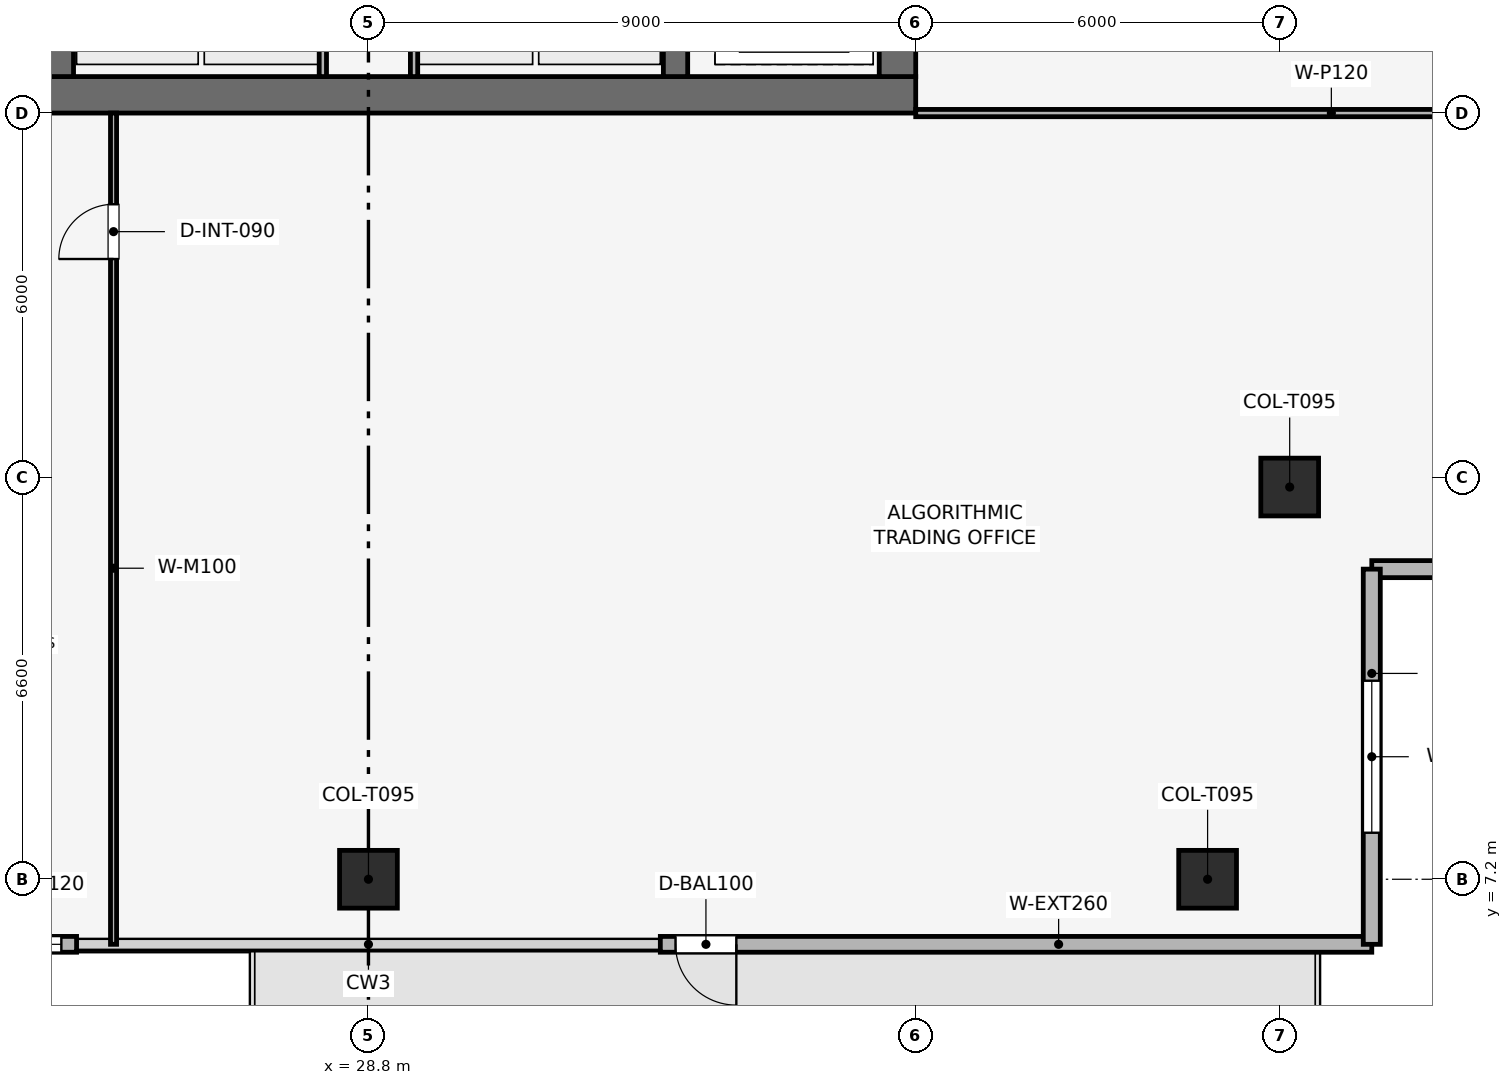
"""IFC4 building model, lengths in metres.
Left out: names, types, materials, properties, quantities, classifications, styles, units other than length and angle.
Written with IfcOpenShell. Run it as: python <this file> out.ifc"""

import sys

from ifc_helpers import new_model, si_unit, direction, frame, frame_2d, origin, origin_2d, place, context, subcontext, project, spatial, rectangle, extrude, element, fill, save


model = new_model("IFC4")
c1 = context("Model", 3, precision=1e-05, world=origin(), true_north=direction((0.0, 1.0)))
c2 = subcontext(c1, "Body", "Model", "MODEL_VIEW")
j1 = project(units=[si_unit("LENGTHUNIT", "METRE"), si_unit("PLANEANGLEUNIT", "RADIAN")], contexts=[c1])
p1 = place(None, origin())
s1 = spatial("IfcSite", under=j1, at=p1, CompositionType="ELEMENT")
p2 = place(p1, origin())
s2 = spatial("IfcBuilding", under=s1, at=p2, CompositionType="ELEMENT")
p3 = place(p2, frame((0.0, 0.0, 299.25)))
s3 = spatial("IfcBuildingStorey", under=s2, at=p3, CompositionType="ELEMENT", Elevation=299.25)
p4 = place(p3, frame((19.8, 20.1, 0.0), z_axis=(0.0, 0.0, 1.0), x_axis=(1.0, 0.0, 0.0)))
e1 = element("IfcWall", 1, at=p4, inside=s3, PredefinedType="SHEAR", context=c2, shape_type="SweptSolid", body=[
    extrude(rectangle(XDim=18.0, YDim=0.6, at=frame_2d((9.0, 0.0))), origin(), (0.0, 0.0, 1.0), 3.75),
])
p5 = place(p3, frame((37.5, 20.4, 0.0), z_axis=(0.0, 0.0, 1.0), x_axis=(0.0, 1.0, 0.0)))
e2 = element("IfcWall", 2, at=p5, inside=s3, PredefinedType="SHEAR", context=c2, shape_type="SweptSolid", body=[
    extrude(rectangle(XDim=16.8, YDim=0.6, at=frame_2d((8.4, 0.0))), origin(), (0.0, 0.0, 1.0), 3.75),
])
p6 = place(p5, frame((4.9, 0.0, 0.0)))
e3 = element("IfcOpeningElement", 3, at=p6, cuts=e2, PredefinedType="OPENING", context=c2, shape_type="SweptSolid", body=[
    extrude(rectangle(XDim=1.1, YDim=2.15, at=frame_2d((0.55, 1.075))), frame((0.0, 0.31, 0.0), z_axis=(0.0, -1.0, 0.0), x_axis=(1.0, 0.0, 0.0)), (0.0, 0.0, 1.0), 0.62),
])
for number, where, z_axis, x_axis in (
    (4, (23.75, 20.4, 0.0), (0.0, 0.0, 1.0), (0.0, 1.0, 0.0)),
    (5, (33.85, 20.4, 0.0), (0.0, 0.0, 1.0), (0.0, 1.0, 0.0)),
):
    element("IfcWall", number, at=place(p3, frame(where, z_axis=z_axis, x_axis=x_axis)), inside=s3, PredefinedType="SHEAR", context=c2, shape_type="SweptSolid", body=[
        extrude(rectangle(XDim=16.8, YDim=0.4, at=frame_2d((8.4, 0.0))), origin(), (0.0, 0.0, 1.0), 3.75),
    ])
for number, where, z_axis, x_axis in (
    (6, (28.8, 7.2, 0.003), (0.0, 0.0, 1.0), (1.0, 0.0, 0.0)),
    (7, (42.6, 7.2, 0.003), (0.0, 0.0, 1.0), (1.0, 0.0, 0.0)),
    (8, (43.95, 13.65, 0.003), (0.0, 0.0, 1.0), (1.0, 0.0, 0.0)),
):
    element("IfcColumn", number, at=place(p3, frame(where, z_axis=z_axis, x_axis=x_axis)), inside=s3, PredefinedType="COLUMN", context=c2, shape_type="SweptSolid", body=[
        extrude(rectangle(XDim=0.95, YDim=0.95, at=origin_2d()), origin(), (0.0, 0.0, 1.0), 3.504),
    ])
p7 = place(p3, frame((45.3, 6.13, 0.0), z_axis=(0.0, 0.0, 1.0), x_axis=(-1.0, 0.0, 0.0)))
e9 = element("IfcWall", 9, at=p7, inside=s3, PredefinedType="SOLIDWALL", context=c2, shape_type="SweptSolid", body=[
    extrude(rectangle(XDim=11.7, YDim=0.26, at=frame_2d((5.85, 0.0))), origin(), (0.0, 0.0, 1.0), 3.51),
])
p8 = place(p7, frame((10.45, 0.0, 0.0)))
e10 = element("IfcOpeningElement", 10, at=p8, cuts=e9, PredefinedType="OPENING", context=c2, shape_type="SweptSolid", body=[
    extrude(rectangle(XDim=1.0, YDim=2.2, at=frame_2d((0.5, 1.1))), frame((0.0, 0.14, 0.0), z_axis=(0.0, -1.0, 0.0), x_axis=(1.0, 0.0, 0.0)), (0.0, 0.0, 1.0), 0.28),
])
p9 = place(p3, frame((24.0, 6.13, 0.0), z_axis=(0.0, 0.0, 1.0), x_axis=(-1.0, 0.0, 0.0)))
e11 = element("IfcWall", 11, at=p9, inside=s3, PredefinedType="SOLIDWALL", context=c2, shape_type="SweptSolid", body=[
    extrude(rectangle(XDim=11.7, YDim=0.26, at=frame_2d((5.85, 0.0))), origin(), (0.0, 0.0, 1.0), 3.51),
])
p10 = place(p9, frame((0.25, 0.0, 0.9)))
e12 = element("IfcOpeningElement", 12, at=p10, cuts=e11, PredefinedType="OPENING", context=c2, shape_type="SweptSolid", body=[
    extrude(rectangle(XDim=1.2, YDim=2.1, at=frame_2d((0.6, 1.05))), frame((0.0, 0.14, 0.0), z_axis=(0.0, -1.0, 0.0), x_axis=(1.0, 0.0, 0.0)), (0.0, 0.0, 1.0), 0.28),
])
p11 = place(p3, frame((51.47, 12.3, 0.0), z_axis=(0.0, 0.0, 1.0), x_axis=(-1.0, 0.0, 0.0)))
e13 = element("IfcWall", 13, at=p11, inside=s3, PredefinedType="SOLIDWALL", context=c2, shape_type="SweptSolid", body=[
    extrude(rectangle(XDim=6.17, YDim=0.28, at=frame_2d((3.085, 0.0))), origin(), (0.0, 0.0, 1.0), 3.51),
])
p12 = place(p11, frame((1.835, 0.0, 0.9)))
e14 = element("IfcOpeningElement", 14, at=p12, cuts=e13, PredefinedType="OPENING", context=c2, shape_type="SweptSolid", body=[
    extrude(rectangle(XDim=2.5, YDim=1.9, at=frame_2d((1.25, 0.95))), frame((0.0, 0.15, 0.0), z_axis=(0.0, -1.0, 0.0), x_axis=(1.0, 0.0, 0.0)), (0.0, 0.0, 1.0), 0.3),
])
p13 = place(p3, frame((45.3, 12.3, 0.0), z_axis=(0.0, 0.0, 1.0), x_axis=(0.0, -1.0, 0.0)))
e15 = element("IfcWall", 15, at=p13, inside=s3, PredefinedType="SOLIDWALL", context=c2, shape_type="SweptSolid", body=[
    extrude(rectangle(XDim=6.17, YDim=0.28, at=frame_2d((3.085, 0.0))), origin(), (0.0, 0.0, 1.0), 3.51),
])
p14 = place(p13, frame((1.835, 0.0, 0.9)))
e16 = element("IfcOpeningElement", 16, at=p14, cuts=e15, PredefinedType="OPENING", context=c2, shape_type="SweptSolid", body=[
    extrude(rectangle(XDim=2.5, YDim=1.9, at=frame_2d((1.25, 0.95))), frame((0.0, 0.15, 0.0), z_axis=(0.0, -1.0, 0.0), x_axis=(1.0, 0.0, 0.0)), (0.0, 0.0, 1.0), 0.3),
])
for number, where, z_axis, x_axis in (
    (17, (28.05, 20.4, 0.0), (0.0, 0.0, 1.0), (0.0, 1.0, 0.0)),
    (18, (29.55, 20.4, 0.0), (0.0, 0.0, 1.0), (0.0, 1.0, 0.0)),
):
    element("IfcWall", number, at=place(p3, frame(where, z_axis=z_axis, x_axis=x_axis)), inside=s3, PredefinedType="PARTITIONING", context=c2, shape_type="SweptSolid", body=[
        extrude(rectangle(XDim=2.75, YDim=0.12, at=frame_2d((1.375, 0.0))), origin(), (0.0, 0.0, 1.0), 3.51),
    ])
p15 = place(p3, frame((24.608, 6.13, 0.0), z_axis=(0.0, 0.0, 1.0), x_axis=(0.0, 1.0, 0.0)))
e19 = element("IfcWall", 19, at=p15, inside=s3, PredefinedType="MOVABLE", context=c2, shape_type="SweptSolid", body=[
    extrude(rectangle(XDim=13.67, YDim=0.1, at=frame_2d((6.835, 0.0))), origin(), (0.0, 0.0, 1.0), 3.135),
])
p16 = place(p15, frame((11.27, 0.0, 0.0)))
e20 = element("IfcOpeningElement", 20, at=p16, cuts=e19, PredefinedType="OPENING", context=c2, shape_type="SweptSolid", body=[
    extrude(rectangle(XDim=0.9, YDim=2.1, at=frame_2d((0.45, 1.05))), frame((0.0, 0.06, 0.0), z_axis=(0.0, -1.0, 0.0), x_axis=(1.0, 0.0, 0.0)), (0.0, 0.0, 1.0), 0.12),
])
p17 = place(p3, frame((37.8, 19.8, 0.0), z_axis=(0.0, 0.0, 1.0), x_axis=(1.0, 0.0, 0.0)))
e21 = element("IfcWall", 21, at=p17, inside=s3, PredefinedType="PARTITIONING", context=c2, shape_type="SweptSolid", body=[
    extrude(rectangle(XDim=13.67, YDim=0.12, at=frame_2d((6.835, 0.0))), origin(), (0.0, 0.0, 1.0), 3.095),
])
p18 = place(p8, origin())
e22 = element("IfcDoor", 22, at=p18, inside=s3, OperationType="SINGLE_SWING_LEFT", PredefinedType="DOOR", context=c2, shape_type="SweptSolid", body=[
    extrude(rectangle(XDim=1.0, YDim=2.2, at=frame_2d((0.5, 1.1))), frame((0.0, 0.025, 0.0), z_axis=(0.0, -1.0, 0.0), x_axis=(1.0, 0.0, 0.0)), (0.0, 0.0, 1.0), 0.05),
])
fill(e10, e22)
p19 = place(p10, origin())
e23 = element("IfcWindow", 23, at=p19, inside=s3, PartitioningType="SINGLE_PANEL", PredefinedType="WINDOW", context=c2, shape_type="SweptSolid", body=[
    extrude(rectangle(XDim=1.2, YDim=2.1, at=frame_2d((0.6, 1.05))), frame((0.0, 0.03, 0.0), z_axis=(0.0, -1.0, 0.0), x_axis=(1.0, 0.0, 0.0)), (0.0, 0.0, 1.0), 0.06),
])
fill(e12, e23)
p20 = place(p14, origin())
e24 = element("IfcWindow", 24, at=p20, inside=s3, PartitioningType="SINGLE_PANEL", PredefinedType="WINDOW", context=c2, shape_type="SweptSolid", body=[
    extrude(rectangle(XDim=2.5, YDim=1.9, at=frame_2d((1.25, 0.95))), frame((0.0, 0.03, 0.0), z_axis=(0.0, -1.0, 0.0), x_axis=(1.0, 0.0, 0.0)), (0.0, 0.0, 1.0), 0.06),
])
fill(e16, e24)
p21 = place(p16, origin())
e25 = element("IfcDoor", 25, at=p21, inside=s3, OperationType="SINGLE_SWING_LEFT", PredefinedType="DOOR", context=c2, shape_type="SweptSolid", body=[
    extrude(rectangle(XDim=0.9, YDim=2.1, at=frame_2d((0.45, 1.05))), frame((0.0, 0.025, 0.0), z_axis=(0.0, -1.0, 0.0), x_axis=(1.0, 0.0, 0.0)), (0.0, 0.0, 1.0), 0.05),
])
fill(e20, e25)
save(model, sys.argv[1])
